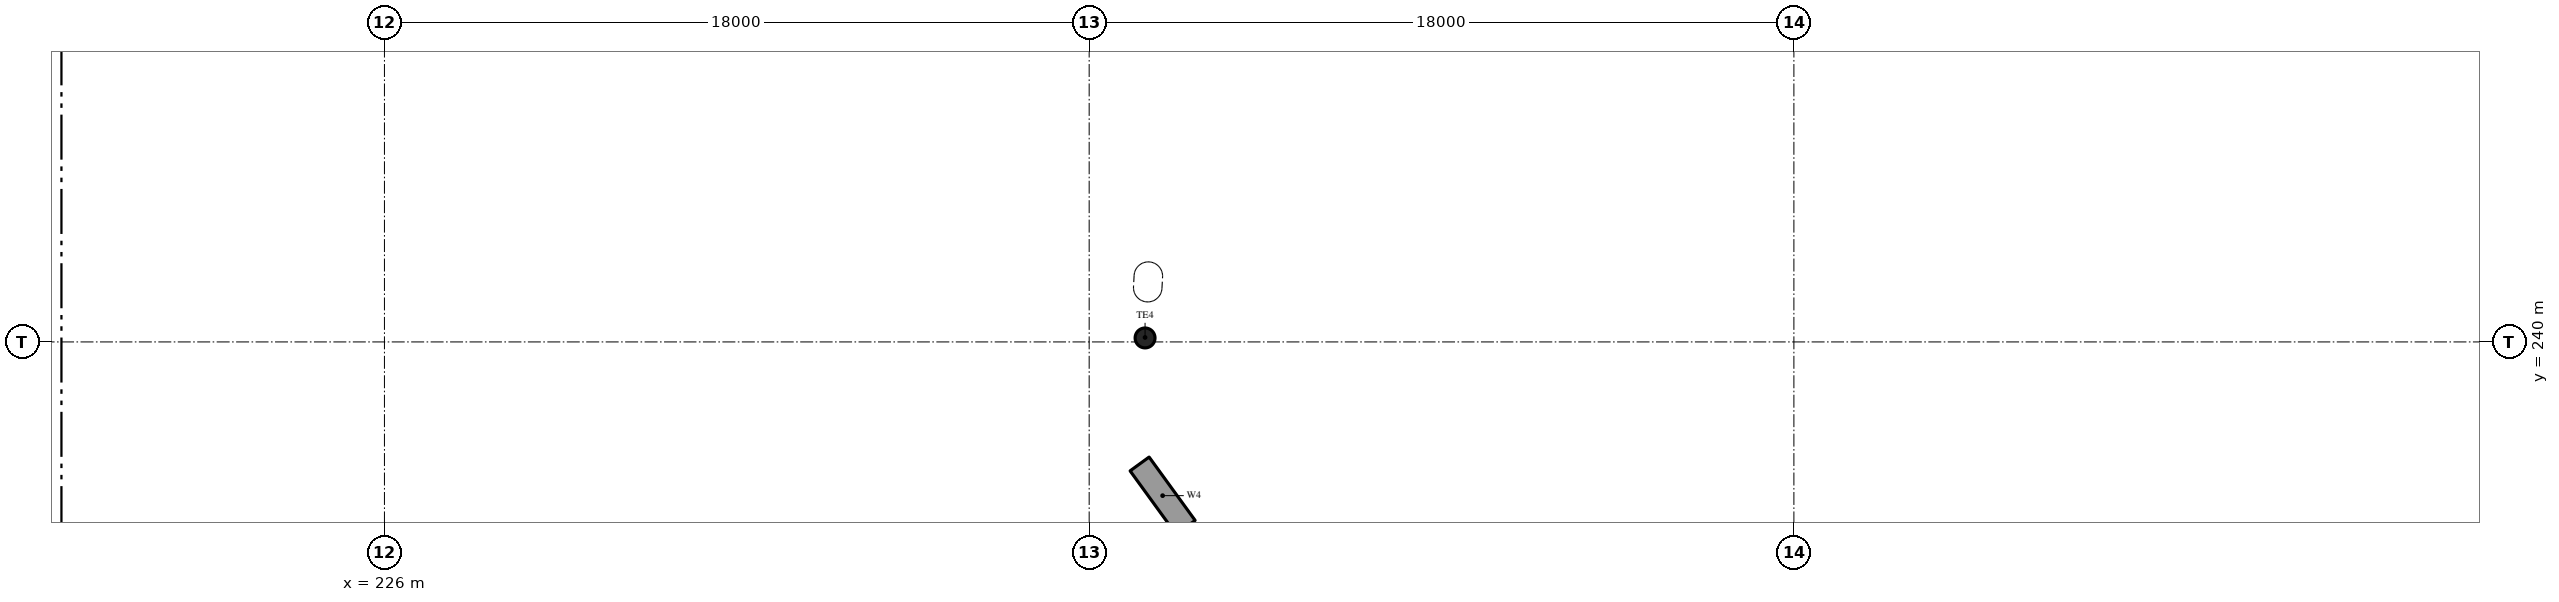
"""IFC4 building model, lengths in metres.
Left out: names, types, materials, properties, quantities, classifications, styles, units other than length and angle.
Written with IfcOpenShell. Run it as: python <this file> out.ifc"""

import sys

from ifc_helpers import new_model, si_unit, direction, frame, frame_2d, origin, origin_2d, place, context, subcontext, project, spatial, rectangle, hollow_circle, extrude, element, save


model = new_model("IFC4")
c1 = context("Model", 3, precision=1e-05, world=origin(), true_north=direction((0.0, 1.0)))
c2 = subcontext(c1, "Body", "Model", "MODEL_VIEW")
j1 = project(units=[si_unit("LENGTHUNIT", "METRE"), si_unit("PLANEANGLEUNIT", "RADIAN")], contexts=[c1])
p1 = place(None, origin())
s1 = spatial("IfcSite", under=j1, at=p1, CompositionType="ELEMENT")
p2 = place(p1, origin())
s2 = spatial("IfcBuilding", under=s1, at=p2, CompositionType="ELEMENT")
p3 = place(p2, origin())
s3 = spatial("IfcBuildingStorey", under=s2, at=p3, CompositionType="ELEMENT", Elevation=0.0)
p4 = place(p3, frame((246.464, 235.265, -0.3), z_axis=(0.0, 0.0, 1.0), x_axis=(-0.587743397701, 0.809047401861, 0.0)))
e1 = element("IfcWall", 1, at=p4, inside=s3, PredefinedType="SOLIDWALL", context=c2, shape_type="SweptSolid", body=[
    extrude(rectangle(XDim=2.0, YDim=0.6, at=frame_2d((1.0, 0.0))), origin(), (0.0, 0.0, 1.0), 7.5),
])
p5 = place(p3, frame((245.511, 241.68, -0.3), z_axis=(-0.020577087951, -0.387905104063, 0.921469594557), x_axis=(0.998595985928, -0.052972227524, 0.0)))
e2 = element("IfcColumn", 2, at=p5, inside=s3, PredefinedType="COLUMN", context=c2, shape_type="SweptSolid", body=[
    extrude(hollow_circle(Radius=0.254, WallThickness=0.016, at=origin_2d()), origin(), (0.0, 0.0, 1.0), 8.139),
])
save(model, sys.argv[1])
